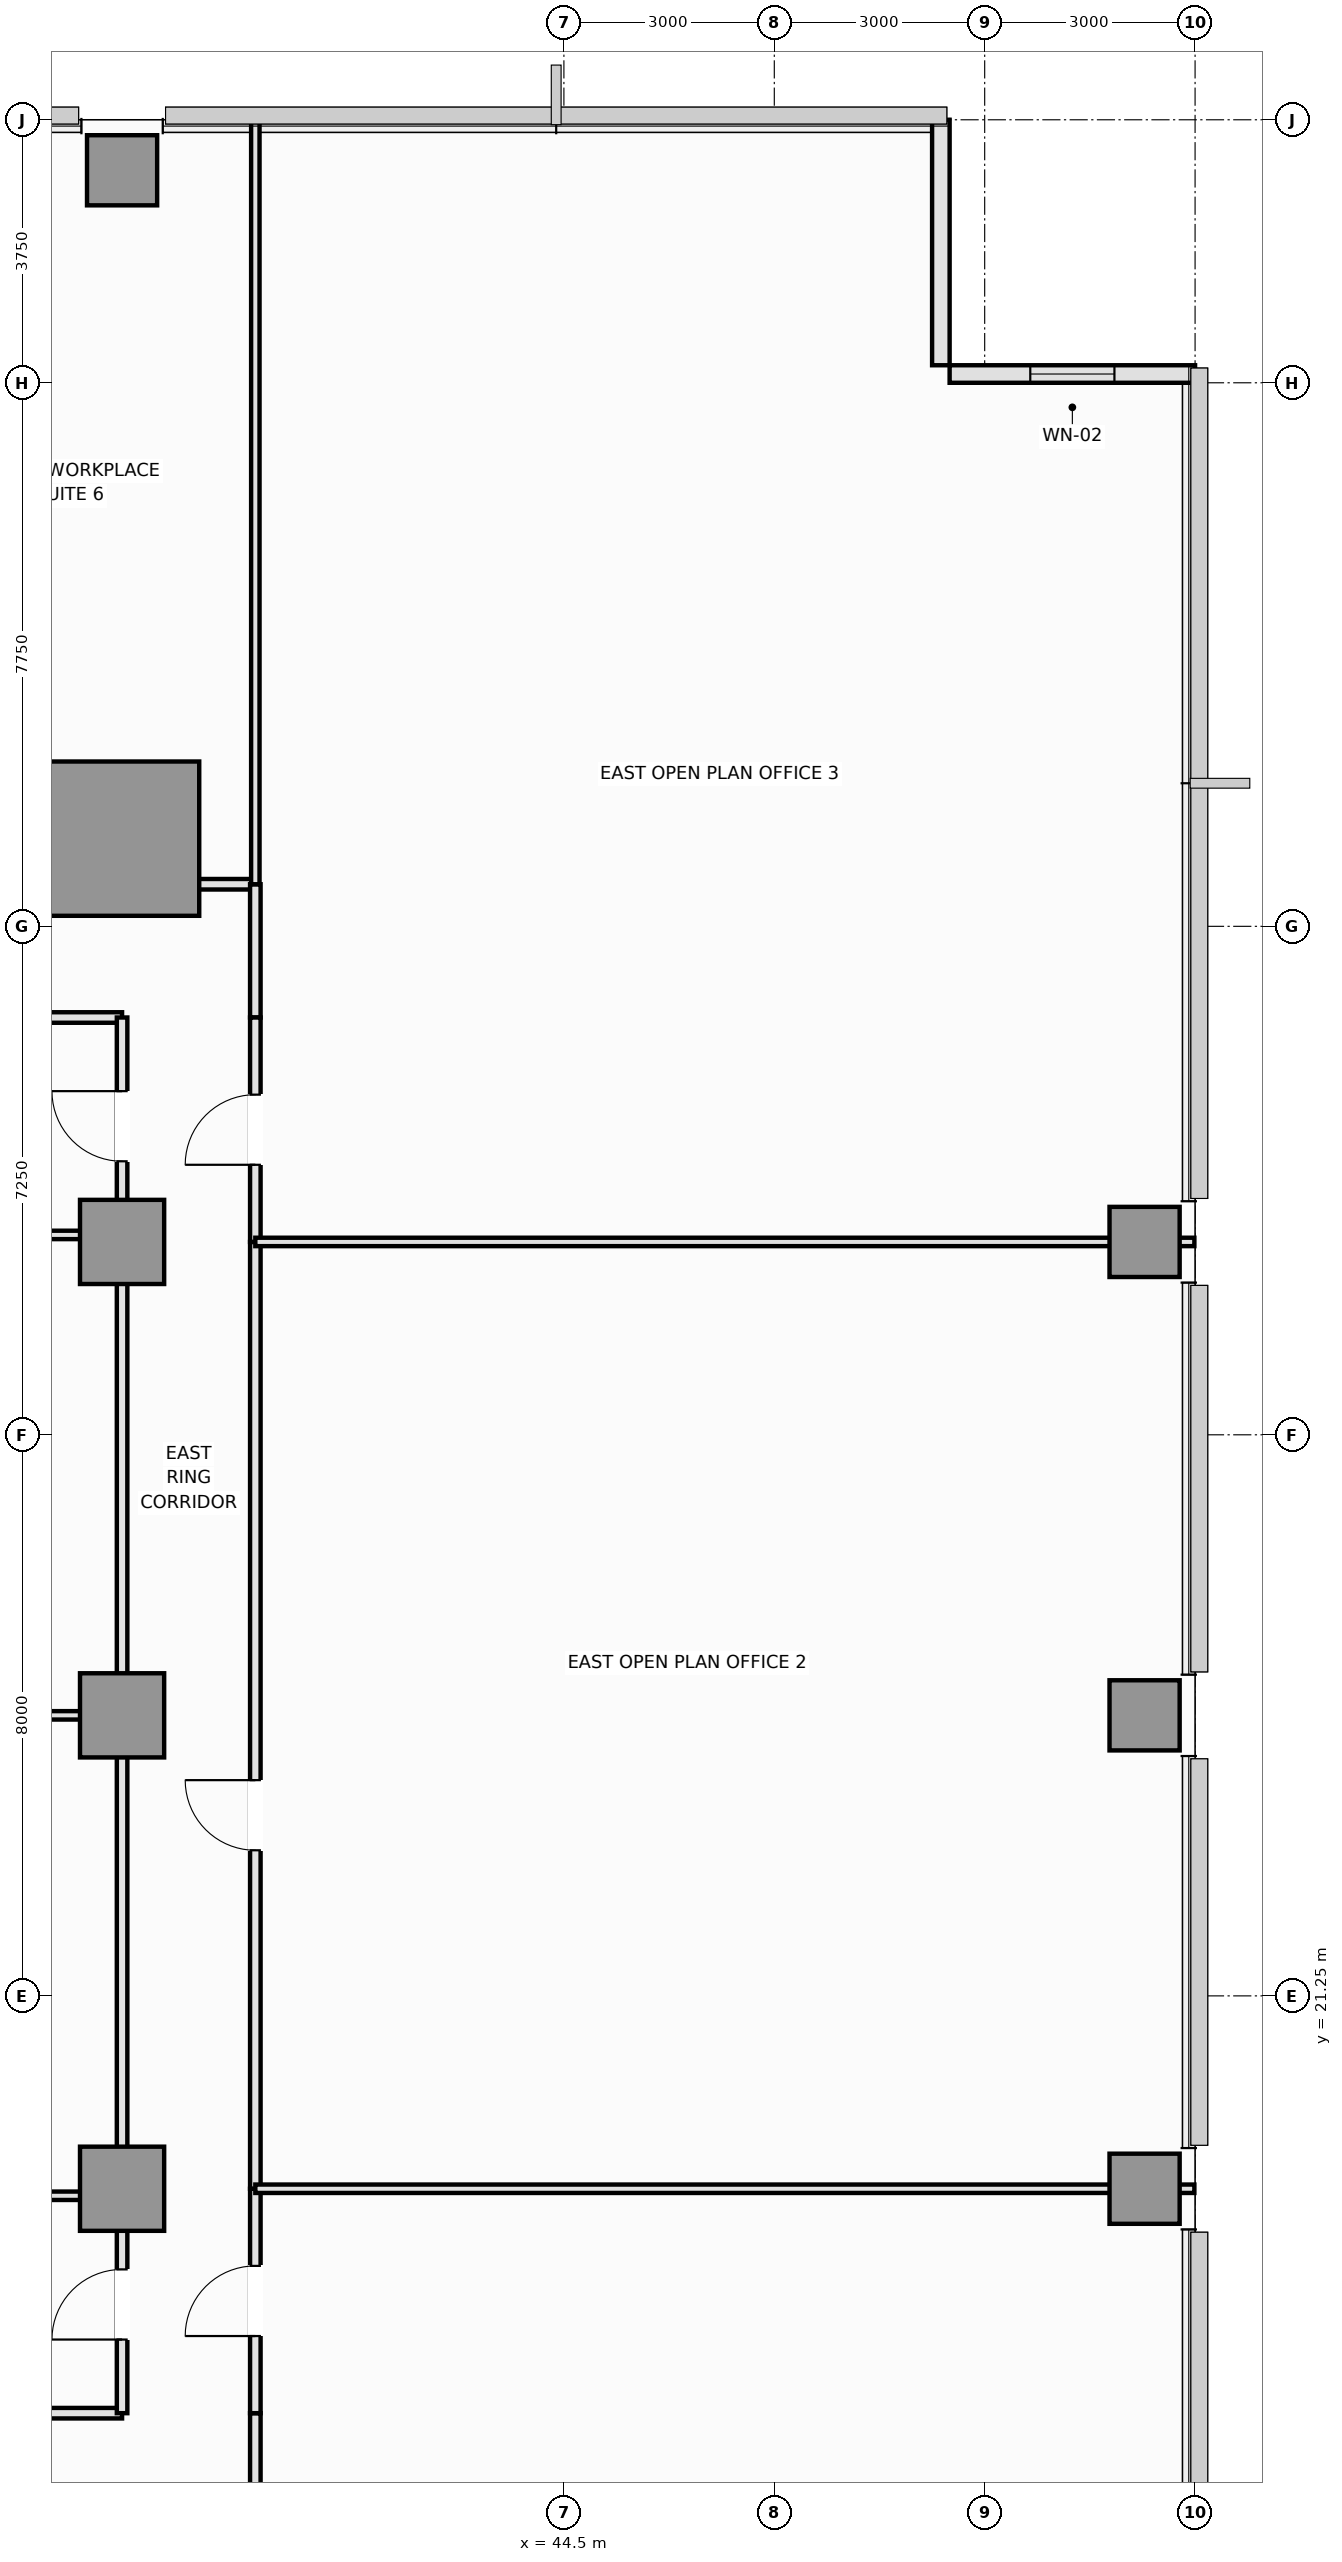
"""IFC4 building model, lengths in metres.
Left out: names, types, materials, properties, quantities, classifications, styles, units other than length and angle.
Written with IfcOpenShell. Run it as: python <this file> out.ifc"""

import sys

from ifc_helpers import new_model, si_unit, direction, frame, frame_2d, origin, origin_2d, place, context, subcontext, project, spatial, rectangle, extrude, element, fill, save


model = new_model("IFC4")
c1 = context("Model", 3, precision=1e-05, world=origin(), true_north=direction((0.0, 1.0)))
c2 = subcontext(c1, "Body", "Model", "MODEL_VIEW")
j1 = project(units=[si_unit("LENGTHUNIT", "METRE"), si_unit("PLANEANGLEUNIT", "RADIAN")], contexts=[c1])
p1 = place(None, origin())
s1 = spatial("IfcSite", under=j1, at=p1, CompositionType="ELEMENT")
p2 = place(p1, origin())
s2 = spatial("IfcBuilding", under=s1, at=p2, CompositionType="ELEMENT")
p3 = place(p2, frame((0.0, 0.0, 54.0)))
s3 = spatial("IfcBuildingStorey", under=s2, at=p3, CompositionType="ELEMENT", Elevation=54.0)
p4 = place(p3, frame((38.2, 37.75, 0.0), z_axis=(0.0, 0.0, 1.0), x_axis=(1.0, 0.0, 0.0)))
e1 = element("IfcColumn", 1, at=p4, inside=s3, PredefinedType="COLUMN", context=c2, shape_type="SweptSolid", body=[
    extrude(rectangle(XDim=2.2, YDim=2.2, at=origin_2d()), origin(), (0.0, 0.0, 1.0), 3.55),
])
for number, where, z_axis, x_axis in (
    (2, (38.2, 18.5, 0.0), (0.0, 0.0, 1.0), (1.0, 0.0, 0.0)),
    (3, (38.2, 25.25, 0.0), (0.0, 0.0, 1.0), (1.0, 0.0, 0.0)),
    (4, (38.2, 32.0, 0.0), (0.0, 0.0, 1.0), (1.0, 0.0, 0.0)),
):
    element("IfcColumn", number, at=place(p3, frame(where, z_axis=z_axis, x_axis=x_axis)), inside=s3, PredefinedType="COLUMN", context=c2, shape_type="SweptSolid", body=[
        extrude(rectangle(XDim=1.2, YDim=1.2, at=origin_2d()), origin(), (0.0, 0.0, 1.0), 3.55),
    ])
for number, where, z_axis, x_axis in (
    (5, (52.78, 18.5, 0.0), (0.0, 0.0, 1.0), (1.0, 0.0, 0.0)),
    (6, (52.78, 25.25, 0.0), (0.0, 0.0, 1.0), (1.0, 0.0, 0.0)),
    (7, (52.78, 32.0, 0.0), (0.0, 0.0, 1.0), (1.0, 0.0, 0.0)),
    (8, (38.2, 47.28, 0.0), (0.0, 0.0, 1.0), (1.0, 0.0, 0.0)),
):
    element("IfcColumn", number, at=place(p3, frame(where, z_axis=z_axis, x_axis=x_axis)), inside=s3, PredefinedType="COLUMN", context=c2, shape_type="SweptSolid", body=[
        extrude(rectangle(XDim=1.0, YDim=1.0, at=origin_2d()), origin(), (0.0, 0.0, 1.0), 3.55),
    ])
p5 = place(p3, frame((53.5, 44.375, 0.0), z_axis=(0.0, 0.0, 1.0), x_axis=(-1.0, 0.0, 0.0)))
e9 = element("IfcWall", 9, at=p5, inside=s3, PredefinedType="SOLIDWALL", context=c2, shape_type="SweptSolid", body=[
    extrude(rectangle(XDim=3.5, YDim=0.25, at=frame_2d((1.75, 0.0))), origin(), (0.0, 0.0, 1.0), 3.37),
])
p6 = place(p5, frame((1.15, 0.0, 0.9)))
e10 = element("IfcOpeningElement", 10, at=p6, cuts=e9, PredefinedType="OPENING", context=c2, shape_type="SweptSolid", body=[
    extrude(rectangle(XDim=1.2, YDim=1.8, at=frame_2d((0.6, 0.9))), frame((0.0, 0.135, 0.0), z_axis=(0.0, -1.0, 0.0), x_axis=(1.0, 0.0, 0.0)), (0.0, 0.0, 1.0), 0.27),
])
p7 = place(p3, frame((49.875, 44.5, 0.0), z_axis=(0.0, 0.0, 1.0), x_axis=(0.0, 1.0, 0.0)))
e11 = element("IfcWall", 11, at=p7, inside=s3, PredefinedType="SOLIDWALL", context=c2, shape_type="SweptSolid", body=[
    extrude(rectangle(XDim=3.5, YDim=0.25, at=frame_2d((1.75, 0.0))), origin(), (0.0, 0.0, 1.0), 3.37),
])
p8 = place(p3, frame((29.8, 15.3, 0.0), z_axis=(0.0, 0.0, 1.0), x_axis=(1.0, 0.0, 0.0)))
e12 = element("IfcWall", 12, at=p8, inside=s3, PredefinedType="PARTITIONING", context=c2, shape_type="SweptSolid", body=[
    extrude(rectangle(XDim=8.4, YDim=0.15, at=frame_2d((4.2, 0.0))), origin(), (0.0, 0.0, 1.0), 3.37),
])
p9 = place(p3, frame((40.1, 13.4, 0.0), z_axis=(0.0, 0.0, 1.0), x_axis=(0.0, 1.0, 0.0)))
e13 = element("IfcWall", 13, at=p9, inside=s3, PredefinedType="PARTITIONING", context=c2, shape_type="SweptSolid", body=[
    extrude(rectangle(XDim=1.9, YDim=0.15, at=frame_2d((0.95, 0.0))), origin(), (0.0, 0.0, 1.0), 3.37),
])
p10 = place(p3, frame((29.8, 35.2, 0.0), z_axis=(0.0, 0.0, 1.0), x_axis=(1.0, 0.0, 0.0)))
e14 = element("IfcWall", 14, at=p10, inside=s3, PredefinedType="PARTITIONING", context=c2, shape_type="SweptSolid", body=[
    extrude(rectangle(XDim=8.4, YDim=0.15, at=frame_2d((4.2, 0.0))), origin(), (0.0, 0.0, 1.0), 3.37),
])
p11 = place(p3, frame((34.8, 37.1, 0.0), z_axis=(0.0, 0.0, 1.0), x_axis=(1.0, 0.0, 0.0)))
e15 = element("IfcWall", 15, at=p11, inside=s3, PredefinedType="PARTITIONING", context=c2, shape_type="SweptSolid", body=[
    extrude(rectangle(XDim=5.3, YDim=0.15, at=frame_2d((2.65, 0.0))), origin(), (0.0, 0.0, 1.0), 3.37),
])
p12 = place(p11, frame((0.91, 0.0, 0.0)))
e16 = element("IfcOpeningElement", 16, at=p12, cuts=e15, PredefinedType="OPENING", context=c2, shape_type="SweptSolid", body=[
    extrude(rectangle(XDim=1.0, YDim=2.15, at=frame_2d((0.5, 1.075))), frame((0.0, 0.085, 0.0), z_axis=(0.0, -1.0, 0.0), x_axis=(1.0, 0.0, 0.0)), (0.0, 0.0, 1.0), 0.17),
])
p13 = place(p3, frame((40.1, 35.2, 0.0), z_axis=(0.0, 0.0, 1.0), x_axis=(0.0, 1.0, 0.0)))
e17 = element("IfcWall", 17, at=p13, inside=s3, PredefinedType="PARTITIONING", context=c2, shape_type="SweptSolid", body=[
    extrude(rectangle(XDim=1.9, YDim=0.15, at=frame_2d((0.95, 0.0))), origin(), (0.0, 0.0, 1.0), 3.37),
])
p14 = place(p3, frame((38.2, 15.3, 0.0), z_axis=(0.0, 0.0, 1.0), x_axis=(0.0, 1.0, 0.0)))
e18 = element("IfcWall", 18, at=p14, inside=s3, PredefinedType="PARTITIONING", context=c2, shape_type="SweptSolid", body=[
    extrude(rectangle(XDim=3.1, YDim=0.15, at=frame_2d((1.55, 0.0))), origin(), (0.0, 0.0, 1.0), 2.82),
])
p15 = place(p14, frame((1.05, 0.0, 0.0)))
e19 = element("IfcOpeningElement", 19, at=p15, cuts=e18, PredefinedType="OPENING", context=c2, shape_type="SweptSolid", body=[
    extrude(rectangle(XDim=1.0, YDim=2.15, at=frame_2d((0.5, 1.075))), frame((0.0, 0.085, 0.0), z_axis=(0.0, -1.0, 0.0), x_axis=(1.0, 0.0, 0.0)), (0.0, 0.0, 1.0), 0.17),
])
p16 = place(p3, frame((38.2, 32.1, 0.0), z_axis=(0.0, 0.0, 1.0), x_axis=(0.0, 1.0, 0.0)))
e20 = element("IfcWall", 20, at=p16, inside=s3, PredefinedType="PARTITIONING", context=c2, shape_type="SweptSolid", body=[
    extrude(rectangle(XDim=3.1, YDim=0.15, at=frame_2d((1.55, 0.0))), origin(), (0.0, 0.0, 1.0), 2.82),
])
p17 = place(p16, frame((1.05, 0.0, 0.0)))
e21 = element("IfcOpeningElement", 21, at=p17, cuts=e20, PredefinedType="OPENING", context=c2, shape_type="SweptSolid", body=[
    extrude(rectangle(XDim=1.0, YDim=2.15, at=frame_2d((0.5, 1.075))), frame((0.0, 0.085, 0.0), z_axis=(0.0, -1.0, 0.0), x_axis=(1.0, 0.0, 0.0)), (0.0, 0.0, 1.0), 0.17),
])
for number, where, z_axis, x_axis in (
    (22, (38.2, 18.4, 0.0), (0.0, 0.0, 1.0), (0.0, 1.0, 0.0)),
    (23, (38.2, 25.25, 0.0), (0.0, 0.0, 1.0), (0.0, 1.0, 0.0)),
):
    element("IfcWall", number, at=place(p3, frame(where, z_axis=z_axis, x_axis=x_axis)), inside=s3, PredefinedType="PARTITIONING", context=c2, shape_type="SweptSolid", body=[
        extrude(rectangle(XDim=6.85, YDim=0.15, at=frame_2d((3.425, 0.0))), origin(), (0.0, 0.0, 1.0), 2.82),
    ])
p18 = place(p3, frame((40.1, 15.3, 0.0), z_axis=(0.0, 0.0, 1.0), x_axis=(0.0, 1.0, 0.0)))
e24 = element("IfcWall", 24, at=p18, inside=s3, PredefinedType="PARTITIONING", context=c2, shape_type="SweptSolid", body=[
    extrude(rectangle(XDim=3.2, YDim=0.15, at=frame_2d((1.6, 0.0))), origin(), (0.0, 0.0, 1.0), 3.37),
])
p19 = place(p18, frame((1.1, 0.0, 0.0)))
e25 = element("IfcOpeningElement", 25, at=p19, cuts=e24, PredefinedType="OPENING", context=c2, shape_type="SweptSolid", body=[
    extrude(rectangle(XDim=1.0, YDim=2.15, at=frame_2d((0.5, 1.075))), frame((0.0, 0.085, 0.0), z_axis=(0.0, -1.0, 0.0), x_axis=(1.0, 0.0, 0.0)), (0.0, 0.0, 1.0), 0.17),
])
p20 = place(p3, frame((40.1, 18.5, 0.0), z_axis=(0.0, 0.0, 1.0), x_axis=(0.0, 1.0, 0.0)))
e26 = element("IfcWall", 26, at=p20, inside=s3, PredefinedType="PARTITIONING", context=c2, shape_type="SweptSolid", body=[
    extrude(rectangle(XDim=13.5, YDim=0.15, at=frame_2d((6.75, 0.0))), origin(), (0.0, 0.0, 1.0), 3.37),
])
p21 = place(p20, frame((4.826, 0.0, 0.0)))
e27 = element("IfcOpeningElement", 27, at=p21, cuts=e26, PredefinedType="OPENING", context=c2, shape_type="SweptSolid", body=[
    extrude(rectangle(XDim=1.0, YDim=2.15, at=frame_2d((0.5, 1.075))), frame((0.0, 0.085, 0.0), z_axis=(0.0, -1.0, 0.0), x_axis=(1.0, 0.0, 0.0)), (0.0, 0.0, 1.0), 0.17),
])
p22 = place(p3, frame((40.1, 32.0, 0.0), z_axis=(0.0, 0.0, 1.0), x_axis=(0.0, 1.0, 0.0)))
e28 = element("IfcWall", 28, at=p22, inside=s3, PredefinedType="PARTITIONING", context=c2, shape_type="SweptSolid", body=[
    extrude(rectangle(XDim=3.2, YDim=0.15, at=frame_2d((1.6, 0.0))), origin(), (0.0, 0.0, 1.0), 3.37),
])
p23 = place(p22, frame((1.1, 0.0, 0.0)))
e29 = element("IfcOpeningElement", 29, at=p23, cuts=e28, PredefinedType="OPENING", context=c2, shape_type="SweptSolid", body=[
    extrude(rectangle(XDim=1.0, YDim=2.15, at=frame_2d((0.5, 1.075))), frame((0.0, 0.085, 0.0), z_axis=(0.0, -1.0, 0.0), x_axis=(1.0, 0.0, 0.0)), (0.0, 0.0, 1.0), 0.17),
])
for number, where, z_axis, x_axis in (
    (30, (29.8, 18.4, 0.0), (0.0, 0.0, 1.0), (1.0, 0.0, 0.0)),
    (31, (29.8, 32.1, 0.0), (0.0, 0.0, 1.0), (1.0, 0.0, 0.0)),
):
    element("IfcWall", number, at=place(p3, frame(where, z_axis=z_axis, x_axis=x_axis)), inside=s3, PredefinedType="PARTITIONING", context=c2, shape_type="SweptSolid", body=[
        extrude(rectangle(XDim=8.4, YDim=0.12, at=frame_2d((4.2, 0.0))), origin(), (0.0, 0.0, 1.0), 2.72),
    ])
p24 = place(p3, frame((24.45, 25.25, 0.0), z_axis=(0.0, 0.0, 1.0), x_axis=(1.0, 0.0, 0.0)))
e32 = element("IfcWall", 32, at=p24, inside=s3, PredefinedType="PARTITIONING", context=c2, shape_type="SweptSolid", body=[
    extrude(rectangle(XDim=13.75, YDim=0.12, at=frame_2d((6.875, 0.0))), origin(), (0.0, 0.0, 1.0), 2.72),
])
p25 = place(p3, frame((40.1, 37.1, 0.0), z_axis=(0.0, 0.0, 1.0), x_axis=(0.0, 1.0, 0.0)))
e33 = element("IfcWall", 33, at=p25, inside=s3, PredefinedType="PARTITIONING", context=c2, shape_type="SweptSolid", body=[
    extrude(rectangle(XDim=10.89, YDim=0.12, at=frame_2d((5.445, 0.0))), origin(), (0.0, 0.0, 1.0), 3.37),
])
for number, where, z_axis, x_axis in (
    (34, (40.1, 18.5, 0.0), (0.0, 0.0, 1.0), (1.0, 0.0, 0.0)),
    (35, (40.1, 32.0, 0.0), (0.0, 0.0, 1.0), (1.0, 0.0, 0.0)),
):
    element("IfcWall", number, at=place(p3, frame(where, z_axis=z_axis, x_axis=x_axis)), inside=s3, PredefinedType="PARTITIONING", context=c2, shape_type="SweptSolid", body=[
        extrude(rectangle(XDim=13.39, YDim=0.12, at=frame_2d((6.695, 0.0))), origin(), (0.0, 0.0, 1.0), 2.72),
    ])
p26 = place(p6, origin())
e36 = element("IfcWindow", 36, at=p26, inside=s3, PartitioningType="SINGLE_PANEL", PredefinedType="WINDOW", context=c2, shape_type="SweptSolid", body=[
    extrude(rectangle(XDim=1.2, YDim=1.8, at=frame_2d((0.6, 0.9))), frame((0.0, 0.03, 0.0), z_axis=(0.0, -1.0, 0.0), x_axis=(1.0, 0.0, 0.0)), (0.0, 0.0, 1.0), 0.06),
])
fill(e10, e36)
p27 = place(p15, origin())
e37 = element("IfcDoor", 37, at=p27, inside=s3, OperationType="SINGLE_SWING_LEFT", PredefinedType="DOOR", context=c2, shape_type="SweptSolid", body=[
    extrude(rectangle(XDim=1.0, YDim=2.15, at=frame_2d((0.5, 1.075))), frame((0.0, 0.025, 0.0), z_axis=(0.0, -1.0, 0.0), x_axis=(1.0, 0.0, 0.0)), (0.0, 0.0, 1.0), 0.05),
])
fill(e19, e37)
p28 = place(p17, origin())
e38 = element("IfcDoor", 38, at=p28, inside=s3, OperationType="SINGLE_SWING_RIGHT", PredefinedType="DOOR", context=c2, shape_type="SweptSolid", body=[
    extrude(rectangle(XDim=1.0, YDim=2.15, at=frame_2d((0.5, 1.075))), frame((0.0, 0.025, 0.0), z_axis=(0.0, -1.0, 0.0), x_axis=(1.0, 0.0, 0.0)), (0.0, 0.0, 1.0), 0.05),
])
fill(e21, e38)
p29 = place(p19, origin())
e39 = element("IfcDoor", 39, at=p29, inside=s3, OperationType="SINGLE_SWING_LEFT", PredefinedType="DOOR", context=c2, shape_type="SweptSolid", body=[
    extrude(rectangle(XDim=1.0, YDim=2.15, at=frame_2d((0.5, 1.075))), frame((0.0, 0.025, 0.0), z_axis=(0.0, -1.0, 0.0), x_axis=(1.0, 0.0, 0.0)), (0.0, 0.0, 1.0), 0.05),
])
fill(e25, e39)
p30 = place(p21, origin())
e40 = element("IfcDoor", 40, at=p30, inside=s3, OperationType="SINGLE_SWING_RIGHT", PredefinedType="DOOR", context=c2, shape_type="SweptSolid", body=[
    extrude(rectangle(XDim=1.0, YDim=2.15, at=frame_2d((0.5, 1.075))), frame((0.0, 0.025, 0.0), z_axis=(0.0, -1.0, 0.0), x_axis=(1.0, 0.0, 0.0)), (0.0, 0.0, 1.0), 0.05),
])
fill(e27, e40)
p31 = place(p23, origin())
e41 = element("IfcDoor", 41, at=p31, inside=s3, OperationType="SINGLE_SWING_LEFT", PredefinedType="DOOR", context=c2, shape_type="SweptSolid", body=[
    extrude(rectangle(XDim=1.0, YDim=2.15, at=frame_2d((0.5, 1.075))), frame((0.0, 0.025, 0.0), z_axis=(0.0, -1.0, 0.0), x_axis=(1.0, 0.0, 0.0)), (0.0, 0.0, 1.0), 0.05),
])
fill(e29, e41)
save(model, sys.argv[1])
